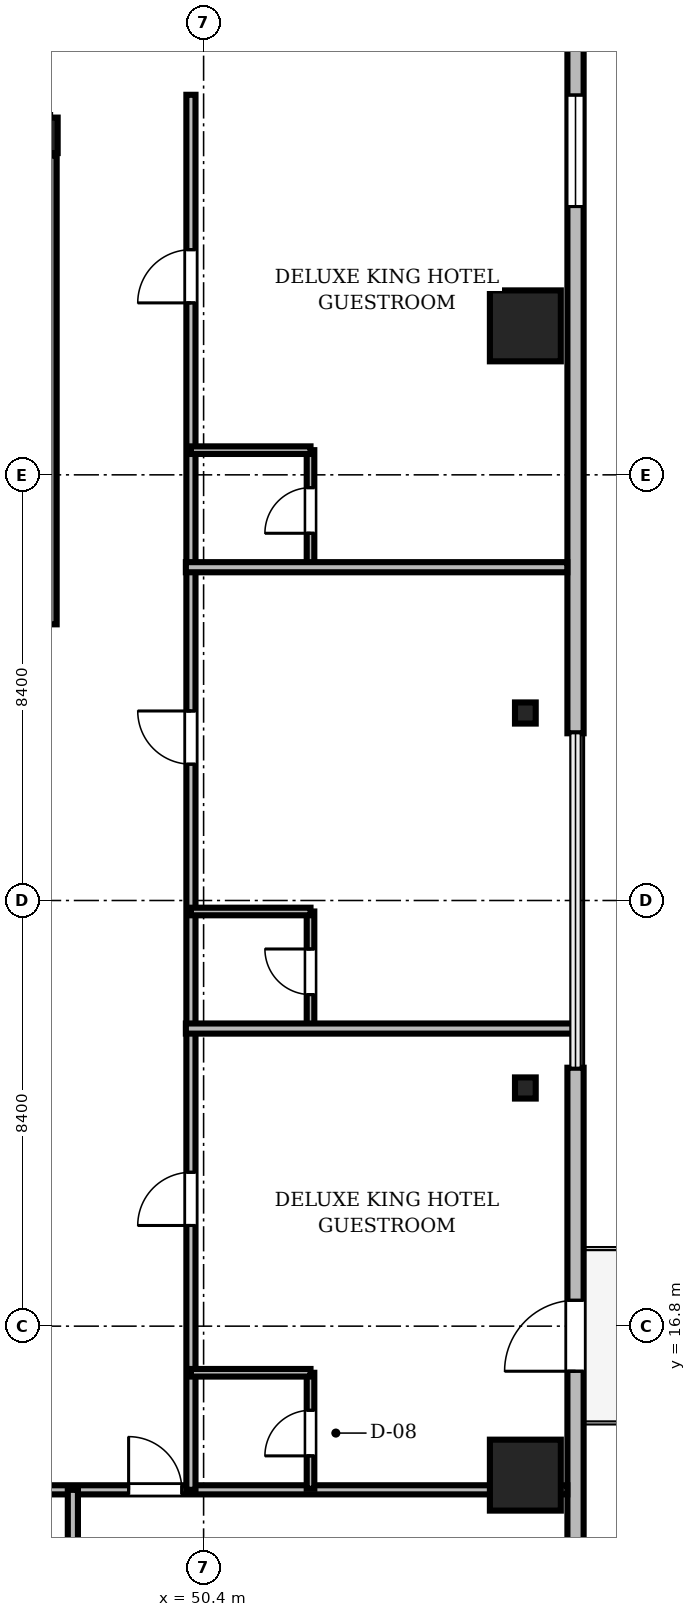
"""IFC4 building model, lengths in metres.
Left out: names, types, materials, properties, quantities, classifications, styles, units other than length and angle.
Written with IfcOpenShell. Run it as: python <this file> out.ifc"""

import sys

from ifc_helpers import new_model, si_unit, direction, frame, frame_2d, origin, origin_2d, place, context, subcontext, project, spatial, rectangle, i_section, extrude, source, transform, mapped, element, fill, save


model = new_model("IFC4")
c1 = context("Model", 3, precision=1e-05, world=origin(), true_north=direction((0.0, 1.0)))
c2 = subcontext(c1, "Body", "Model", "MODEL_VIEW")
j1 = project(units=[si_unit("LENGTHUNIT", "METRE"), si_unit("PLANEANGLEUNIT", "RADIAN")], contexts=[c1])
p1 = place(None, origin())
s1 = spatial("IfcSite", under=j1, at=p1, CompositionType="ELEMENT")
p2 = place(p1, origin())
s2 = spatial("IfcBuilding", under=s1, at=p2, CompositionType="ELEMENT")
p3 = place(p2, frame((0.0, 0.0, 192.3)))
s3 = spatial("IfcBuildingStorey", under=s2, at=p3, CompositionType="ELEMENT", Elevation=192.3)
m1 = source(origin(), c2, "Body", "SweptSolid", [
    extrude(i_section(OverallWidth=0.3, OverallDepth=0.7, WebThickness=0.017, FlangeThickness=0.032, FilletRadius=0.027, at=origin_2d()), origin(), (0.0, 0.0, 1.0), 3.53),
])
p4 = place(p3, frame((47.37, 40.3, 0.0), z_axis=(0.0, 0.0, 1.0), x_axis=(1.0, 0.0, 0.0)))
e1 = element("IfcColumn", 1, at=p4, inside=s3, PredefinedType="COLUMN", context=c2, shape_type="MappedRepresentation", body=[
    mapped(m1, transform((0.0, 0.0, 0.0), scale=1.0)),
])
m2 = source(origin(), c2, "Body", "SweptSolid", [
    extrude(rectangle(XDim=1.4, YDim=1.4, at=origin_2d()), origin(), (0.0, 0.0, 1.0), 3.53),
])
for number, where, z_axis, x_axis in (
    (2, (56.75, 13.86, 0.0), (0.0, 0.0, 1.0), (1.0, 0.0, 0.0)),
    (3, (56.75, 36.54, 0.0), (0.0, 0.0, 1.0), (1.0, 0.0, 0.0)),
):
    element("IfcColumn", number, at=place(p3, frame(where, z_axis=z_axis, x_axis=x_axis)), inside=s3, PredefinedType="COLUMN", context=c2, shape_type="MappedRepresentation", body=[
        mapped(m2, transform((0.0, 0.0, 0.0), scale=1.0)),
    ])
m3 = source(origin(), c2, "Body", "SweptSolid", [
    extrude(i_section(OverallWidth=0.409, OverallDepth=0.417, WebThickness=0.021, FlangeThickness=0.033, FilletRadius=0.015, at=origin_2d()), origin(), (0.0, 0.0, 1.0), 3.53),
])
for number, where, z_axis, x_axis in (
    (4, (56.75, 21.5, 0.0), (0.0, 0.0, 1.0), (1.0, 0.0, 0.0)),
    (5, (56.75, 28.9, 0.0), (0.0, 0.0, 1.0), (1.0, 0.0, 0.0)),
):
    element("IfcColumn", number, at=place(p3, frame(where, z_axis=z_axis, x_axis=x_axis)), inside=s3, PredefinedType="COLUMN", context=c2, shape_type="MappedRepresentation", body=[
        mapped(m3, transform((0.0, 0.0, 0.0), scale=1.0)),
    ])
m4 = source(origin(), c2, "Body", "SweptSolid", [
    extrude(rectangle(XDim=15.6, YDim=0.32, at=frame_2d((7.8, 0.0))), origin(), (0.0, 0.0, 1.0), 3.53),
])
p5 = place(p3, frame((57.74, 6.3, 0.0), z_axis=(0.0, 0.0, 1.0), x_axis=(0.0, 1.0, 0.0)))
e6 = element("IfcWall", 6, at=p5, inside=s3, PredefinedType="SOLIDWALL", context=c2, shape_type="MappedRepresentation", body=[
    mapped(m4, transform((0.0, 0.0, 0.0), scale=1.0)),
])
m5 = source(origin(), c2, "Body", "SweptSolid", [
    extrude(rectangle(XDim=1.4, YDim=2.3, at=frame_2d((0.7, 1.15))), frame((0.0, 0.17, 0.0), z_axis=(0.0, -1.0, 0.0), x_axis=(1.0, 0.0, 0.0)), (0.0, 0.0, 1.0), 0.34),
])
p6 = place(p5, frame((9.61, 0.0, 0.0)))
e7 = element("IfcOpeningElement", 7, at=p6, cuts=e6, PredefinedType="OPENING", context=c2, shape_type="MappedRepresentation", body=[
    mapped(m5, transform((0.0, 0.0, 0.0), scale=1.0)),
])
m6 = source(origin(), c2, "Body", "SweptSolid", [
    extrude(rectangle(XDim=2.2, YDim=2.4, at=frame_2d((1.1, 1.2))), frame((0.0, 0.17, 0.0), z_axis=(0.0, -1.0, 0.0), x_axis=(1.0, 0.0, 0.0)), (0.0, 0.0, 1.0), 0.34),
])
p7 = place(p5, frame((3.005, 0.0, 0.72)))
e8 = element("IfcOpeningElement", 8, at=p7, cuts=e6, PredefinedType="OPENING", context=c2, shape_type="MappedRepresentation", body=[
    mapped(m6, transform((0.0, 0.0, 0.0), scale=1.0)),
])
m7 = source(origin(), c2, "Body", "SweptSolid", [
    extrude(rectangle(XDim=15.6, YDim=0.32, at=frame_2d((7.8, 0.0))), origin(), (0.0, 0.0, 1.0), 3.53),
])
p8 = place(p3, frame((57.74, 28.5, 0.0), z_axis=(0.0, 0.0, 1.0), x_axis=(0.0, 1.0, 0.0)))
e9 = element("IfcWall", 9, at=p8, inside=s3, PredefinedType="SOLIDWALL", context=c2, shape_type="MappedRepresentation", body=[
    mapped(m7, transform((0.0, 0.0, 0.0), scale=1.0)),
])
p9 = place(p8, frame((10.395, 0.0, 0.72)))
e10 = element("IfcOpeningElement", 10, at=p9, cuts=e9, PredefinedType="OPENING", context=c2, shape_type="MappedRepresentation", body=[
    mapped(m6, transform((0.0, 0.0, 0.0), scale=1.0)),
])
m8 = source(origin(), c2, "Body", "SweptSolid", [
    extrude(rectangle(XDim=9.25, YDim=0.25, at=frame_2d((4.625, 0.0))), origin(), (0.0, 0.0, 1.0), 3.55),
])
p10 = place(p3, frame((47.375, 30.65, 0.0), z_axis=(0.0, 0.0, 1.0), x_axis=(0.0, 1.0, 0.0)))
e11 = element("IfcWall", 11, at=p10, inside=s3, PredefinedType="SOLIDWALL", context=c2, shape_type="MappedRepresentation", body=[
    mapped(m8, transform((0.0, 0.0, 0.0), scale=1.0)),
])
m9 = source(origin(), c2, "Body", "SweptSolid", [
    extrude(rectangle(XDim=46.156, YDim=0.18, at=frame_2d((23.078, 0.0))), origin(), (0.0, 0.0, 1.0), 2.772),
])
p11 = place(p3, frame((11.422, 13.57, 0.0), z_axis=(0.0, 0.0, 1.0), x_axis=(1.0, 0.0, 0.0)))
e12 = element("IfcWall", 12, at=p11, inside=s3, PredefinedType="PARTITIONING", context=c2, shape_type="MappedRepresentation", body=[
    mapped(m9, transform((0.0, 0.0, 0.0), scale=1.0)),
])
m10 = source(origin(), c2, "Body", "SweptSolid", [
    extrude(rectangle(XDim=1.05, YDim=2.2, at=frame_2d((0.525, 1.1))), frame((0.0, 0.1, 0.0), z_axis=(0.0, -1.0, 0.0), x_axis=(1.0, 0.0, 0.0)), (0.0, 0.0, 1.0), 0.2),
])
p12 = place(p11, frame((11.798, 0.0, 0.0)))
e13 = element("IfcOpeningElement", 13, at=p12, cuts=e12, PredefinedType="OPENING", context=c2, shape_type="MappedRepresentation", body=[
    mapped(m10, transform((0.0, 0.0, 0.0), scale=1.0)),
])
p13 = place(p11, frame((16.503, 0.0, 0.0)))
e14 = element("IfcOpeningElement", 14, at=p13, cuts=e12, PredefinedType="OPENING", context=c2, shape_type="MappedRepresentation", body=[
    mapped(m10, transform((0.0, 0.0, 0.0), scale=1.0)),
])
p14 = place(p11, frame((24.253, 0.0, 0.0)))
e15 = element("IfcOpeningElement", 15, at=p14, cuts=e12, PredefinedType="OPENING", context=c2, shape_type="MappedRepresentation", body=[
    mapped(m10, transform((0.0, 0.0, 0.0), scale=1.0)),
])
p15 = place(p11, frame((32.003, 0.0, 0.0)))
e16 = element("IfcOpeningElement", 16, at=p15, cuts=e12, PredefinedType="OPENING", context=c2, shape_type="MappedRepresentation", body=[
    mapped(m10, transform((0.0, 0.0, 0.0), scale=1.0)),
])
p16 = place(p11, frame((37.498, 0.0, 0.0)))
e17 = element("IfcOpeningElement", 17, at=p16, cuts=e12, PredefinedType="OPENING", context=c2, shape_type="MappedRepresentation", body=[
    mapped(m10, transform((0.0, 0.0, 0.0), scale=1.0)),
])
m11 = source(origin(), c2, "Body", "SweptSolid", [
    extrude(rectangle(XDim=27.53, YDim=0.18, at=frame_2d((13.765, 0.0))), origin(), (0.0, 0.0, 1.0), 2.972),
])
p17 = place(p3, frame((50.15, 13.57, 0.0), z_axis=(0.0, 0.0, 1.0), x_axis=(0.0, 1.0, 0.0)))
e18 = element("IfcWall", 18, at=p17, inside=s3, PredefinedType="PARTITIONING", context=c2, shape_type="MappedRepresentation", body=[
    mapped(m11, transform((0.0, 0.0, 0.0), scale=1.0)),
])
p18 = place(p17, frame((5.217, 0.0, 0.0)))
e19 = element("IfcOpeningElement", 19, at=p18, cuts=e18, PredefinedType="OPENING", context=c2, shape_type="MappedRepresentation", body=[
    mapped(m10, transform((0.0, 0.0, 0.0), scale=1.0)),
])
p19 = place(p17, frame((14.32, 0.0, 0.0)))
e20 = element("IfcOpeningElement", 20, at=p19, cuts=e18, PredefinedType="OPENING", context=c2, shape_type="MappedRepresentation", body=[
    mapped(m10, transform((0.0, 0.0, 0.0), scale=1.0)),
])
p20 = place(p17, frame((23.423, 0.0, 0.0)))
e21 = element("IfcOpeningElement", 21, at=p20, cuts=e18, PredefinedType="OPENING", context=c2, shape_type="MappedRepresentation", body=[
    mapped(m10, transform((0.0, 0.0, 0.0), scale=1.0)),
])
m12 = source(origin(), c2, "Body", "SweptSolid", [
    extrude(rectangle(XDim=2.29, YDim=0.15, at=frame_2d((1.145, 0.0))), origin(), (0.0, 0.0, 1.0), 2.972),
])
p21 = place(p3, frame((52.51, 13.59, 0.0), z_axis=(0.0, 0.0, 1.0), x_axis=(0.0, 1.0, 0.0)))
e22 = element("IfcWall", 22, at=p21, inside=s3, PredefinedType="PARTITIONING", context=c2, shape_type="MappedRepresentation", body=[
    mapped(m12, transform((0.0, 0.0, 0.0), scale=1.0)),
])
m13 = source(origin(), c2, "Body", "SweptSolid", [
    extrude(rectangle(XDim=0.9, YDim=2.1, at=frame_2d((0.45, 1.05))), frame((0.0, 0.085, 0.0), z_axis=(0.0, -1.0, 0.0), x_axis=(1.0, 0.0, 0.0)), (0.0, 0.0, 1.0), 0.17),
])
p22 = place(p21, frame((0.65, 0.0, 0.0)))
e23 = element("IfcOpeningElement", 23, at=p22, cuts=e22, PredefinedType="OPENING", context=c2, shape_type="MappedRepresentation", body=[
    mapped(m13, transform((0.0, 0.0, 0.0), scale=1.0)),
])
m14 = source(origin(), c2, "Body", "SweptSolid", [
    extrude(rectangle(XDim=2.29, YDim=0.15, at=frame_2d((1.145, 0.0))), origin(), (0.0, 0.0, 1.0), 3.192),
])
p23 = place(p3, frame((52.51, 22.693, 0.0), z_axis=(0.0, 0.0, 1.0), x_axis=(0.0, 1.0, 0.0)))
e24 = element("IfcWall", 24, at=p23, inside=s3, PredefinedType="PARTITIONING", context=c2, shape_type="MappedRepresentation", body=[
    mapped(m14, transform((0.0, 0.0, 0.0), scale=1.0)),
])
p24 = place(p23, frame((0.65, 0.0, 0.0)))
e25 = element("IfcOpeningElement", 25, at=p24, cuts=e24, PredefinedType="OPENING", context=c2, shape_type="MappedRepresentation", body=[
    mapped(m13, transform((0.0, 0.0, 0.0), scale=1.0)),
])
m15 = source(origin(), c2, "Body", "SweptSolid", [
    extrude(rectangle(XDim=2.29, YDim=0.15, at=frame_2d((1.145, 0.0))), origin(), (0.0, 0.0, 1.0), 3.53),
])
p25 = place(p3, frame((52.51, 31.797, 0.0), z_axis=(0.0, 0.0, 1.0), x_axis=(0.0, 1.0, 0.0)))
e26 = element("IfcWall", 26, at=p25, inside=s3, PredefinedType="PARTITIONING", context=c2, shape_type="MappedRepresentation", body=[
    mapped(m15, transform((0.0, 0.0, 0.0), scale=1.0)),
])
p26 = place(p25, frame((0.65, 0.0, 0.0)))
e27 = element("IfcOpeningElement", 27, at=p26, cuts=e26, PredefinedType="OPENING", context=c2, shape_type="MappedRepresentation", body=[
    mapped(m13, transform((0.0, 0.0, 0.0), scale=1.0)),
])
m16 = source(origin(), c2, "Body", "SweptSolid", [
    extrude(rectangle(XDim=11.448, YDim=0.2, at=frame_2d((5.724, 0.0))), origin(), (0.0, 0.0, 1.0), 2.772),
])
p27 = place(p3, frame((47.82, 2.122, 0.0), z_axis=(0.0, 0.0, 1.0), x_axis=(0.0, 1.0, 0.0)))
e28 = element("IfcWall", 28, at=p27, inside=s3, PredefinedType="PARTITIONING", context=c2, shape_type="MappedRepresentation", body=[
    mapped(m16, transform((0.0, 0.0, 0.0), scale=1.0)),
])
m17 = source(origin(), c2, "Body", "SweptSolid", [
    extrude(rectangle(XDim=7.72, YDim=0.2, at=frame_2d((3.86, 0.0))), origin(), (0.0, 0.0, 1.0), 2.772),
])
p28 = place(p3, frame((50.05, 22.673, 0.0), z_axis=(0.0, 0.0, 1.0), x_axis=(1.0, 0.0, 0.0)))
e29 = element("IfcWall", 29, at=p28, inside=s3, PredefinedType="PARTITIONING", context=c2, shape_type="MappedRepresentation", body=[
    mapped(m17, transform((0.0, 0.0, 0.0), scale=1.0)),
])
m18 = source(origin(), c2, "Body", "SweptSolid", [
    extrude(rectangle(XDim=7.528, YDim=0.2, at=frame_2d((3.764, 0.0))), origin(), (0.0, 0.0, 1.0), 2.772),
])
p29 = place(p3, frame((50.05, 31.777, 0.0), z_axis=(0.0, 0.0, 1.0), x_axis=(1.0, 0.0, 0.0)))
e30 = element("IfcWall", 30, at=p29, inside=s3, PredefinedType="PARTITIONING", context=c2, shape_type="MappedRepresentation", body=[
    mapped(m18, transform((0.0, 0.0, 0.0), scale=1.0)),
])
m19 = source(origin(), c2, "Body", "SweptSolid", [
    extrude(rectangle(XDim=2.36, YDim=0.15, at=frame_2d((1.18, 0.0))), origin(), (0.0, 0.0, 1.0), 3.53),
])
for number, where, z_axis, x_axis in (
    (31, (50.15, 15.88, 0.0), (0.0, 0.0, 1.0), (1.0, 0.0, 0.0)),
    (32, (50.15, 24.983, 0.0), (0.0, 0.0, 1.0), (1.0, 0.0, 0.0)),
    (33, (50.15, 34.087, 0.0), (0.0, 0.0, 1.0), (1.0, 0.0, 0.0)),
):
    element("IfcWall", number, at=place(p3, frame(where, z_axis=z_axis, x_axis=x_axis)), inside=s3, PredefinedType="PARTITIONING", context=c2, shape_type="MappedRepresentation", body=[
        mapped(m19, transform((0.0, 0.0, 0.0), scale=1.0)),
    ])
m20 = source(origin(), c2, "Body", "SweptSolid", [
    extrude(rectangle(XDim=1.4, YDim=2.3, at=frame_2d((0.7, 1.15))), frame((0.0, 0.025, 0.0), z_axis=(0.0, -1.0, 0.0), x_axis=(1.0, 0.0, 0.0)), (0.0, 0.0, 1.0), 0.05),
])
p30 = place(p6, frame((1.4, 0.0, 0.0), z_axis=(0.0, 0.0, 1.0), x_axis=(-1.0, 0.0, 0.0)))
e34 = element("IfcDoor", 34, at=p30, inside=s3, OperationType="DOUBLE_DOOR_SLIDING", PredefinedType="DOOR", context=c2, shape_type="MappedRepresentation", body=[
    mapped(m20, transform((0.0, 0.0, 0.0), scale=1.0)),
])
fill(e7, e34)
m21 = source(origin(), c2, "Body", "SweptSolid", [
    extrude(rectangle(XDim=2.2, YDim=2.4, at=frame_2d((1.1, 1.2))), frame((0.0, 0.03, 0.0), z_axis=(0.0, -1.0, 0.0), x_axis=(1.0, 0.0, 0.0)), (0.0, 0.0, 1.0), 0.06),
])
p31 = place(p9, origin())
e35 = element("IfcWindow", 35, at=p31, inside=s3, PartitioningType="SINGLE_PANEL", PredefinedType="WINDOW", context=c2, shape_type="MappedRepresentation", body=[
    mapped(m21, transform((0.0, 0.0, 0.0), scale=1.0)),
])
fill(e10, e35)
m22 = source(origin(), c2, "Body", "SweptSolid", [
    extrude(rectangle(XDim=1.05, YDim=2.2, at=frame_2d((0.525, 1.1))), frame((0.0, 0.025, 0.0), z_axis=(0.0, -1.0, 0.0), x_axis=(1.0, 0.0, 0.0)), (0.0, 0.0, 1.0), 0.05),
])
p32 = place(p16, origin())
e36 = element("IfcDoor", 36, at=p32, inside=s3, OperationType="SINGLE_SWING_LEFT", PredefinedType="DOOR", context=c2, shape_type="MappedRepresentation", body=[
    mapped(m22, transform((0.0, 0.0, 0.0), scale=1.0)),
])
fill(e17, e36)
p33 = place(p18, origin())
e37 = element("IfcDoor", 37, at=p33, inside=s3, OperationType="SINGLE_SWING_LEFT", PredefinedType="DOOR", context=c2, shape_type="MappedRepresentation", body=[
    mapped(m22, transform((0.0, 0.0, 0.0), scale=1.0)),
])
fill(e19, e37)
p34 = place(p19, origin())
e38 = element("IfcDoor", 38, at=p34, inside=s3, OperationType="SINGLE_SWING_RIGHT", PredefinedType="DOOR", context=c2, shape_type="MappedRepresentation", body=[
    mapped(m22, transform((0.0, 0.0, 0.0), scale=1.0)),
])
fill(e20, e38)
p35 = place(p20, origin())
e39 = element("IfcDoor", 39, at=p35, inside=s3, OperationType="SINGLE_SWING_LEFT", PredefinedType="DOOR", context=c2, shape_type="MappedRepresentation", body=[
    mapped(m22, transform((0.0, 0.0, 0.0), scale=1.0)),
])
fill(e21, e39)
m23 = source(origin(), c2, "Body", "SweptSolid", [
    extrude(rectangle(XDim=0.9, YDim=2.1, at=frame_2d((0.45, 1.05))), frame((0.0, 0.025, 0.0), z_axis=(0.0, -1.0, 0.0), x_axis=(1.0, 0.0, 0.0)), (0.0, 0.0, 1.0), 0.05),
])
p36 = place(p22, origin())
e40 = element("IfcDoor", 40, at=p36, inside=s3, OperationType="SINGLE_SWING_LEFT", PredefinedType="DOOR", context=c2, shape_type="MappedRepresentation", body=[
    mapped(m23, transform((0.0, 0.0, 0.0), scale=1.0)),
])
fill(e23, e40)
p37 = place(p24, origin())
e41 = element("IfcDoor", 41, at=p37, inside=s3, OperationType="SINGLE_SWING_RIGHT", PredefinedType="DOOR", context=c2, shape_type="MappedRepresentation", body=[
    mapped(m23, transform((0.0, 0.0, 0.0), scale=1.0)),
])
fill(e25, e41)
p38 = place(p26, origin())
e42 = element("IfcDoor", 42, at=p38, inside=s3, OperationType="SINGLE_SWING_LEFT", PredefinedType="DOOR", context=c2, shape_type="MappedRepresentation", body=[
    mapped(m23, transform((0.0, 0.0, 0.0), scale=1.0)),
])
fill(e27, e42)
save(model, sys.argv[1])
